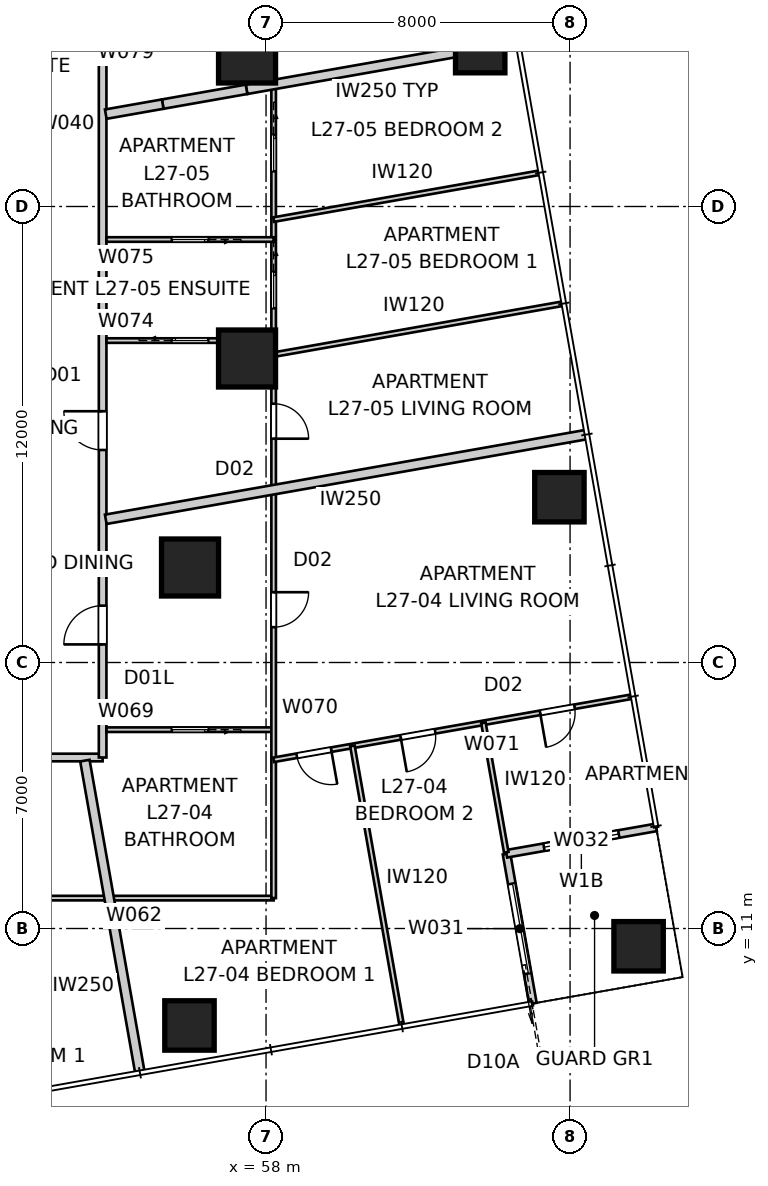
"""IFC4 building model, lengths in metres.
Left out: names, types, materials, properties, quantities, classifications, styles, units other than length and angle.
Written with IfcOpenShell. Run it as: python <this file> out.ifc"""

import sys

from ifc_helpers import new_model, si_unit, direction, frame, frame_2d, origin, origin_2d, place, context, subcontext, project, spatial, rectangle, extrude, element, fill, save


model = new_model("IFC4")
c1 = context("Model", 3, precision=1e-05, world=origin(), true_north=direction((0.0, 1.0)))
c2 = subcontext(c1, "Body", "Model", "MODEL_VIEW")
j1 = project(units=[si_unit("LENGTHUNIT", "METRE"), si_unit("PLANEANGLEUNIT", "RADIAN")], contexts=[c1])
p1 = place(None, origin())
s1 = spatial("IfcSite", under=j1, at=p1, CompositionType="ELEMENT")
p2 = place(p1, origin())
s2 = spatial("IfcBuilding", under=s1, at=p2, CompositionType="ELEMENT")
p3 = place(p2, frame((0.0, 0.0, 99.8)))
s3 = spatial("IfcBuildingStorey", under=s2, at=p3, CompositionType="ELEMENT", Elevation=99.8)
for number, where, z_axis, x_axis in (
    (1, (55.985, 8.448, 0.0), (0.0, 0.0, 1.0), (1.0, 0.0, 0.0)),
    (2, (67.803, 10.532, 0.0), (0.0, 0.0, 1.0), (1.0, 0.0, 0.0)),
    (3, (65.719, 22.35, 0.0), (0.0, 0.0, 1.0), (1.0, 0.0, 0.0)),
    (4, (63.635, 34.167, 0.0), (0.0, 0.0, 1.0), (1.0, 0.0, 0.0)),
):
    element("IfcColumn", number, at=place(p3, frame(where, z_axis=z_axis, x_axis=x_axis)), inside=s3, PredefinedType="COLUMN", context=c2, shape_type="SweptSolid", body=[
        extrude(rectangle(XDim=1.3, YDim=1.3, at=origin_2d()), origin(), (0.0, 0.0, 1.0), 3.4),
    ])
for number, where, z_axis, x_axis in (
    (5, (57.5, 26.0, 0.0), (0.0, 0.0, 1.0), (1.0, 0.0, 0.0)),
    (6, (57.5, 34.0, 0.0), (0.0, 0.0, 1.0), (1.0, 0.0, 0.0)),
    (7, (56.0, 20.5, 0.0), (0.0, 0.0, 1.0), (1.0, 0.0, 0.0)),
):
    element("IfcColumn", number, at=place(p3, frame(where, z_axis=z_axis, x_axis=x_axis)), inside=s3, PredefinedType="COLUMN", context=c2, shape_type="SweptSolid", body=[
        extrude(rectangle(XDim=1.5, YDim=1.5, at=origin_2d()), origin(), (0.0, 0.0, 1.0), 3.4),
    ])
p4 = place(p3, frame((65.022, 9.026, 0.0), z_axis=(0.0, 0.0, 1.0), x_axis=(-0.173646056486, 0.984808127031, 0.0)))
e8 = element("IfcWall", 8, at=p4, inside=s3, PredefinedType="SOLIDWALL", context=c2, shape_type="SweptSolid", body=[
    extrude(rectangle(XDim=4.0, YDim=0.2, at=frame_2d((2.0, 0.0))), origin(), (0.0, 0.0, 1.0), 3.25),
])
p5 = place(p4, frame((0.8, 0.0, 0.0)))
e9 = element("IfcOpeningElement", 9, at=p5, cuts=e8, PredefinedType="OPENING", context=c2, shape_type="SweptSolid", body=[
    extrude(rectangle(XDim=2.4, YDim=2.1, at=frame_2d((1.2, 1.05))), frame((0.0, 0.11, 0.0), z_axis=(0.0, -1.0, 0.0), x_axis=(1.0, 0.0, 0.0)), (0.0, 0.0, 1.0), 0.22),
])
p6 = place(p3, frame((64.328, 12.966, 0.0), z_axis=(0.0, 0.0, 1.0), x_axis=(0.984808127031, 0.173646056486, 0.0)))
e10 = element("IfcWall", 10, at=p6, inside=s3, PredefinedType="SOLIDWALL", context=c2, shape_type="SweptSolid", body=[
    extrude(rectangle(XDim=4.0, YDim=0.2, at=frame_2d((2.0, 0.0))), origin(), (0.0, 0.0, 1.0), 3.25),
])
p7 = place(p6, frame((1.0, 0.0, 0.45)))
e11 = element("IfcOpeningElement", 11, at=p7, cuts=e10, PredefinedType="OPENING", context=c2, shape_type="SweptSolid", body=[
    extrude(rectangle(XDim=2.0, YDim=1.8, at=frame_2d((1.0, 0.9))), frame((0.0, 0.11, 0.0), z_axis=(0.0, -1.0, 0.0), x_axis=(1.0, 0.0, 0.0)), (0.0, 0.0, 1.0), 0.22),
])
p8 = place(p3, frame((26.3, 15.5, 0.0), z_axis=(0.0, 0.0, 1.0), x_axis=(1.0, 0.0, 0.0)))
e12 = element("IfcWall", 12, at=p8, inside=s3, PredefinedType="PARTITIONING", context=c2, shape_type="SweptSolid", body=[
    extrude(rectangle(XDim=27.4, YDim=0.2, at=frame_2d((13.7, 0.0))), origin(), (0.0, 0.0, 1.0), 3.25),
])
p9 = place(p8, frame((24.005, 0.0, 0.0)))
e13 = element("IfcOpeningElement", 13, at=p9, cuts=e12, PredefinedType="OPENING", context=c2, shape_type="SweptSolid", body=[
    extrude(rectangle(XDim=1.02, YDim=2.1, at=frame_2d((0.51, 1.05))), frame((0.0, 0.11, 0.0), z_axis=(0.0, -1.0, 0.0), x_axis=(1.0, 0.0, 0.0)), (0.0, 0.0, 1.0), 0.22),
])
p10 = place(p8, frame((1.765, 0.0, 0.0)))
e14 = element("IfcOpeningElement", 14, at=p10, cuts=e12, PredefinedType="OPENING", context=c2, shape_type="SweptSolid", body=[
    extrude(rectangle(XDim=1.02, YDim=2.1, at=frame_2d((0.51, 1.05))), frame((0.0, 0.11, 0.0), z_axis=(0.0, -1.0, 0.0), x_axis=(1.0, 0.0, 0.0)), (0.0, 0.0, 1.0), 0.22),
])
p11 = place(p3, frame((53.7, 15.5, 0.0), z_axis=(0.0, 0.0, 1.0), x_axis=(0.0, 1.0, 0.0)))
e15 = element("IfcWall", 15, at=p11, inside=s3, PredefinedType="PARTITIONING", context=c2, shape_type="SweptSolid", body=[
    extrude(rectangle(XDim=29.0, YDim=0.2, at=frame_2d((14.5, 0.0))), origin(), (0.0, 0.0, 1.0), 3.25),
])
p12 = place(p11, frame((24.248, 0.0, 0.0)))
e16 = element("IfcOpeningElement", 16, at=p12, cuts=e15, PredefinedType="OPENING", context=c2, shape_type="SweptSolid", body=[
    extrude(rectangle(XDim=1.02, YDim=2.34, at=frame_2d((0.51, 1.17))), frame((0.0, 0.11, 0.0), z_axis=(0.0, -1.0, 0.0), x_axis=(1.0, 0.0, 0.0)), (0.0, 0.0, 1.0), 0.22),
])
p13 = place(p11, frame((2.976, 0.0, 0.0)))
e17 = element("IfcOpeningElement", 17, at=p13, cuts=e15, PredefinedType="OPENING", context=c2, shape_type="SweptSolid", body=[
    extrude(rectangle(XDim=1.02, YDim=2.1, at=frame_2d((0.51, 1.05))), frame((0.0, 0.11, 0.0), z_axis=(0.0, -1.0, 0.0), x_axis=(1.0, 0.0, 0.0)), (0.0, 0.0, 1.0), 0.22),
])
p14 = place(p11, frame((8.092, 0.0, 0.0)))
e18 = element("IfcOpeningElement", 18, at=p14, cuts=e15, PredefinedType="OPENING", context=c2, shape_type="SweptSolid", body=[
    extrude(rectangle(XDim=1.02, YDim=2.34, at=frame_2d((0.51, 1.17))), frame((0.0, 0.11, 0.0), z_axis=(0.0, -1.0, 0.0), x_axis=(1.0, 0.0, 0.0)), (0.0, 0.0, 1.0), 0.22),
])
p15 = place(p3, frame((54.682, 7.203, 0.0), z_axis=(0.0, 0.0, 1.0), x_axis=(-0.173651756605, 0.984807121942, 0.0)))
e19 = element("IfcWall", 19, at=p15, inside=s3, PredefinedType="PARTITIONING", context=c2, shape_type="SweptSolid", body=[
    extrude(rectangle(XDim=8.341, YDim=0.25, at=frame_2d((4.171, 0.0))), origin(), (0.0, 0.0, 1.0), 3.25),
])
p16 = place(p3, frame((66.444, 24.001, 0.0), z_axis=(0.0, 0.0, 1.0), x_axis=(-0.984809355703, -0.173639088111, 0.0)))
e20 = element("IfcWall", 20, at=p16, inside=s3, PredefinedType="PARTITIONING", context=c2, shape_type="SweptSolid", body=[
    extrude(rectangle(XDim=12.857, YDim=0.25, at=frame_2d((6.428, 0.0))), origin(), (0.0, 0.0, 1.0), 3.25),
])
p17 = place(p3, frame((64.62, 34.341, 0.0), z_axis=(0.0, 0.0, 1.0), x_axis=(-0.984802553948, -0.173677660443, 0.0)))
e21 = element("IfcWall", 21, at=p17, inside=s3, PredefinedType="PARTITIONING", context=c2, shape_type="SweptSolid", body=[
    extrude(rectangle(XDim=7.244, YDim=0.25, at=frame_2d((3.622, 0.0))), origin(), (0.0, 0.0, 1.0), 3.25),
])
p18 = place(p3, frame((57.487, 33.083, 0.0), z_axis=(0.0, 0.0, 1.0), x_axis=(-0.984809882944, -0.17363609779, 0.0)))
e22 = element("IfcWall", 22, at=p18, inside=s3, PredefinedType="PARTITIONING", context=c2, shape_type="SweptSolid", body=[
    extrude(rectangle(XDim=2.24, YDim=0.25, at=frame_2d((1.12, 0.0))), origin(), (0.0, 0.0, 1.0), 2.795),
])
p19 = place(p3, frame((55.281, 32.694, 0.0), z_axis=(0.0, 0.0, 1.0), x_axis=(-0.984815846312, -0.173602272028, 0.0)))
e23 = element("IfcWall", 23, at=p19, inside=s3, PredefinedType="PARTITIONING", context=c2, shape_type="SweptSolid", body=[
    extrude(rectangle(XDim=1.522, YDim=0.25, at=frame_2d((0.761, 0.0))), origin(), (0.0, 0.0, 1.0), 3.25),
])
p20 = place(p3, frame((58.2, 11.8, 0.0), z_axis=(0.0, 0.0, 1.0), x_axis=(-1.0, 0.0, 0.0)))
e24 = element("IfcWall", 24, at=p20, inside=s3, PredefinedType="PARTITIONING", context=c2, shape_type="SweptSolid", body=[
    extrude(rectangle(XDim=25.653, YDim=0.12, at=frame_2d((12.826, 0.0))), origin(), (0.0, 0.0, 1.0), 3.25),
])
p21 = place(p20, frame((7.342, 0.0, 0.0)))
e25 = element("IfcOpeningElement", 25, at=p21, cuts=e24, PredefinedType="OPENING", context=c2, shape_type="SweptSolid", body=[
    extrude(rectangle(XDim=0.92, YDim=2.34, at=frame_2d((0.46, 1.17))), frame((0.0, 0.07, 0.0), z_axis=(0.0, -1.0, 0.0), x_axis=(1.0, 0.0, 0.0)), (0.0, 0.0, 1.0), 0.14),
])
p22 = place(p20, frame((12.394, 0.0, 0.0)))
e26 = element("IfcOpeningElement", 26, at=p22, cuts=e24, PredefinedType="OPENING", context=c2, shape_type="SweptSolid", body=[
    extrude(rectangle(XDim=0.96, YDim=2.1, at=frame_2d((0.48, 1.05))), frame((0.0, 0.07, 0.0), z_axis=(0.0, -1.0, 0.0), x_axis=(1.0, 0.0, 0.0)), (0.0, 0.0, 1.0), 0.14),
])
p23 = place(p20, frame((16.288, 0.0, 0.0)))
e27 = element("IfcOpeningElement", 27, at=p23, cuts=e24, PredefinedType="OPENING", context=c2, shape_type="SweptSolid", body=[
    extrude(rectangle(XDim=0.96, YDim=2.1, at=frame_2d((0.48, 1.05))), frame((0.0, 0.07, 0.0), z_axis=(0.0, -1.0, 0.0), x_axis=(1.0, 0.0, 0.0)), (0.0, 0.0, 1.0), 0.14),
])
p24 = place(p20, frame((20.134, 0.0, 0.0)))
e28 = element("IfcOpeningElement", 28, at=p24, cuts=e24, PredefinedType="OPENING", context=c2, shape_type="SweptSolid", body=[
    extrude(rectangle(XDim=0.92, YDim=2.34, at=frame_2d((0.46, 1.17))), frame((0.0, 0.07, 0.0), z_axis=(0.0, -1.0, 0.0), x_axis=(1.0, 0.0, 0.0)), (0.0, 0.0, 1.0), 0.14),
])
p25 = place(p3, frame((58.2, 16.232, 0.0), z_axis=(0.0, 0.0, 1.0), x_axis=(-1.0, 0.0, 0.0)))
e29 = element("IfcWall", 29, at=p25, inside=s3, PredefinedType="PARTITIONING", context=c2, shape_type="SweptSolid", body=[
    extrude(rectangle(XDim=4.4, YDim=0.12, at=frame_2d((2.2, 0.0))), origin(), (0.0, 0.0, 1.0), 3.25),
])
p26 = place(p25, frame((1.72, 0.0, 0.0)))
e30 = element("IfcOpeningElement", 30, at=p26, cuts=e29, PredefinedType="OPENING", context=c2, shape_type="SweptSolid", body=[
    extrude(rectangle(XDim=0.96, YDim=2.1, at=frame_2d((0.48, 1.05))), frame((0.0, 0.07, 0.0), z_axis=(0.0, -1.0, 0.0), x_axis=(1.0, 0.0, 0.0)), (0.0, 0.0, 1.0), 0.14),
])
p27 = place(p3, frame((58.2, 48.2, 0.0), z_axis=(0.0, 0.0, 1.0), x_axis=(0.0, -1.0, 0.0)))
e31 = element("IfcWall", 31, at=p27, inside=s3, PredefinedType="PARTITIONING", context=c2, shape_type="SweptSolid", body=[
    extrude(rectangle(XDim=36.4, YDim=0.12, at=frame_2d((18.2, 0.0))), origin(), (0.0, 0.0, 1.0), 3.25),
])
p28 = place(p27, frame((5.671, 0.0, 0.0)))
e32 = element("IfcOpeningElement", 32, at=p28, cuts=e31, PredefinedType="OPENING", context=c2, shape_type="SweptSolid", body=[
    extrude(rectangle(XDim=0.92, YDim=2.34, at=frame_2d((0.46, 1.17))), frame((0.0, 0.07, 0.0), z_axis=(0.0, -1.0, 0.0), x_axis=(1.0, 0.0, 0.0)), (0.0, 0.0, 1.0), 0.14),
])
p29 = place(p27, frame((8.83, 0.0, 0.0)))
e33 = element("IfcOpeningElement", 33, at=p29, cuts=e31, PredefinedType="OPENING", context=c2, shape_type="SweptSolid", body=[
    extrude(rectangle(XDim=0.92, YDim=2.34, at=frame_2d((0.46, 1.17))), frame((0.0, 0.07, 0.0), z_axis=(0.0, -1.0, 0.0), x_axis=(1.0, 0.0, 0.0)), (0.0, 0.0, 1.0), 0.14),
])
p30 = place(p27, frame((28.35, 0.0, 0.0)))
e34 = element("IfcOpeningElement", 34, at=p30, cuts=e31, PredefinedType="OPENING", context=c2, shape_type="SweptSolid", body=[
    extrude(rectangle(XDim=0.92, YDim=2.34, at=frame_2d((0.46, 1.17))), frame((0.0, 0.07, 0.0), z_axis=(0.0, -1.0, 0.0), x_axis=(1.0, 0.0, 0.0)), (0.0, 0.0, 1.0), 0.14),
])
p31 = place(p27, frame((23.39, 0.0, 0.0)))
e35 = element("IfcOpeningElement", 35, at=p31, cuts=e31, PredefinedType="OPENING", context=c2, shape_type="SweptSolid", body=[
    extrude(rectangle(XDim=0.92, YDim=2.34, at=frame_2d((0.46, 1.17))), frame((0.0, 0.07, 0.0), z_axis=(0.0, -1.0, 0.0), x_axis=(1.0, 0.0, 0.0)), (0.0, 0.0, 1.0), 0.14),
])
p32 = place(p27, frame((19.918, 0.0, 0.0)))
e36 = element("IfcOpeningElement", 36, at=p32, cuts=e31, PredefinedType="OPENING", context=c2, shape_type="SweptSolid", body=[
    extrude(rectangle(XDim=0.96, YDim=2.1, at=frame_2d((0.48, 1.05))), frame((0.0, 0.07, 0.0), z_axis=(0.0, -1.0, 0.0), x_axis=(1.0, 0.0, 0.0)), (0.0, 0.0, 1.0), 0.14),
])
p33 = place(p27, frame((16.313, 0.0, 0.0)))
e37 = element("IfcOpeningElement", 37, at=p33, cuts=e31, PredefinedType="OPENING", context=c2, shape_type="SweptSolid", body=[
    extrude(rectangle(XDim=0.96, YDim=2.1, at=frame_2d((0.48, 1.05))), frame((0.0, 0.07, 0.0), z_axis=(0.0, -1.0, 0.0), x_axis=(1.0, 0.0, 0.0)), (0.0, 0.0, 1.0), 0.14),
])
p34 = place(p3, frame((67.62, 17.1, 0.0), z_axis=(0.0, 0.0, 1.0), x_axis=(-0.984808730291, -0.173642635155, 0.0)))
e38 = element("IfcWall", 38, at=p34, inside=s3, PredefinedType="PARTITIONING", context=c2, shape_type="SweptSolid", body=[
    extrude(rectangle(XDim=9.565, YDim=0.12, at=frame_2d((4.782, 0.0))), origin(), (0.0, 0.0, 1.0), 3.25),
])
p35 = place(p34, frame((1.525, 0.0, 0.0)))
e39 = element("IfcOpeningElement", 39, at=p35, cuts=e38, PredefinedType="OPENING", context=c2, shape_type="SweptSolid", body=[
    extrude(rectangle(XDim=0.92, YDim=2.34, at=frame_2d((0.46, 1.17))), frame((0.0, 0.07, 0.0), z_axis=(0.0, -1.0, 0.0), x_axis=(1.0, 0.0, 0.0)), (0.0, 0.0, 1.0), 0.14),
])
p36 = place(p34, frame((5.25, 0.0, 0.0)))
e40 = element("IfcOpeningElement", 40, at=p36, cuts=e38, PredefinedType="OPENING", context=c2, shape_type="SweptSolid", body=[
    extrude(rectangle(XDim=0.92, YDim=2.34, at=frame_2d((0.46, 1.17))), frame((0.0, 0.07, 0.0), z_axis=(0.0, -1.0, 0.0), x_axis=(1.0, 0.0, 0.0)), (0.0, 0.0, 1.0), 0.14),
])
p37 = place(p34, frame((8.028, 0.0, 0.0)))
e41 = element("IfcOpeningElement", 41, at=p37, cuts=e38, PredefinedType="OPENING", context=c2, shape_type="SweptSolid", body=[
    extrude(rectangle(XDim=0.92, YDim=2.34, at=frame_2d((0.46, 1.17))), frame((0.0, 0.07, 0.0), z_axis=(0.0, -1.0, 0.0), x_axis=(1.0, 0.0, 0.0)), (0.0, 0.0, 1.0), 0.14),
])
p38 = place(p3, frame((60.273, 15.805, 0.0), z_axis=(0.0, 0.0, 1.0), x_axis=(0.173647177755, -0.984807929323, 0.0)))
e42 = element("IfcWall", 42, at=p38, inside=s3, PredefinedType="PARTITIONING", context=c2, shape_type="SweptSolid", body=[
    extrude(rectangle(XDim=7.46, YDim=0.12, at=frame_2d((3.73, 0.0))), origin(), (0.0, 0.0, 1.0), 3.25),
])
p39 = place(p3, frame((63.72, 16.412, 0.0), z_axis=(0.0, 0.0, 1.0), x_axis=(0.173660541335, -0.984805572884, 0.0)))
e43 = element("IfcWall", 43, at=p39, inside=s3, PredefinedType="PARTITIONING", context=c2, shape_type="SweptSolid", body=[
    extrude(rectangle(XDim=3.46, YDim=0.12, at=frame_2d((1.73, 0.0))), origin(), (0.0, 0.0, 1.0), 3.25),
])
p40 = place(p3, frame((53.8, 26.472, 0.0), z_axis=(0.0, 0.0, 1.0), x_axis=(1.0, 0.0, 0.0)))
e44 = element("IfcWall", 44, at=p40, inside=s3, PredefinedType="PARTITIONING", context=c2, shape_type="SweptSolid", body=[
    extrude(rectangle(XDim=4.4, YDim=0.12, at=frame_2d((2.2, 0.0))), origin(), (0.0, 0.0, 1.0), 3.25),
])
p41 = place(p40, frame((1.72, 0.0, 0.0)))
e45 = element("IfcOpeningElement", 45, at=p41, cuts=e44, PredefinedType="OPENING", context=c2, shape_type="SweptSolid", body=[
    extrude(rectangle(XDim=0.96, YDim=2.1, at=frame_2d((0.48, 1.05))), frame((0.0, 0.07, 0.0), z_axis=(0.0, -1.0, 0.0), x_axis=(1.0, 0.0, 0.0)), (0.0, 0.0, 1.0), 0.14),
])
p42 = place(p3, frame((58.2, 29.131, 0.0), z_axis=(0.0, 0.0, 1.0), x_axis=(-1.0, 0.0, 0.0)))
e46 = element("IfcWall", 46, at=p42, inside=s3, PredefinedType="PARTITIONING", context=c2, shape_type="SweptSolid", body=[
    extrude(rectangle(XDim=4.4, YDim=0.12, at=frame_2d((2.2, 0.0))), origin(), (0.0, 0.0, 1.0), 3.25),
])
p43 = place(p42, frame((1.72, 0.0, 0.0)))
e47 = element("IfcOpeningElement", 47, at=p43, cuts=e46, PredefinedType="OPENING", context=c2, shape_type="SweptSolid", body=[
    extrude(rectangle(XDim=0.96, YDim=2.1, at=frame_2d((0.48, 1.05))), frame((0.0, 0.07, 0.0), z_axis=(0.0, -1.0, 0.0), x_axis=(1.0, 0.0, 0.0)), (0.0, 0.0, 1.0), 0.14),
])
p44 = place(p3, frame((58.2, 26.101, 0.0), z_axis=(0.0, 0.0, 1.0), x_axis=(0.984804581119, 0.173666165406, 0.0)))
e48 = element("IfcWall", 48, at=p44, inside=s3, PredefinedType="PARTITIONING", context=c2, shape_type="SweptSolid", body=[
    extrude(rectangle(XDim=7.714, YDim=0.12, at=frame_2d((3.857, 0.0))), origin(), (0.0, 0.0, 1.0), 3.25),
])
p45 = place(p3, frame((58.2, 29.655, 0.0), z_axis=(0.0, 0.0, 1.0), x_axis=(0.984809869921, 0.17363617165, 0.0)))
e49 = element("IfcWall", 49, at=p45, inside=s3, PredefinedType="PARTITIONING", context=c2, shape_type="SweptSolid", body=[
    extrude(rectangle(XDim=7.096, YDim=0.12, at=frame_2d((3.548, 0.0))), origin(), (0.0, 0.0, 1.0), 3.25),
])
p46 = place(p5, origin())
e50 = element("IfcDoor", 50, at=p46, inside=s3, OperationType="SLIDING_TO_LEFT", PredefinedType="DOOR", context=c2, shape_type="SweptSolid", body=[
    extrude(rectangle(XDim=2.4, YDim=2.1, at=frame_2d((1.2, 1.05))), frame((0.0, 0.025, 0.0), z_axis=(0.0, -1.0, 0.0), x_axis=(1.0, 0.0, 0.0)), (0.0, 0.0, 1.0), 0.05),
])
fill(e9, e50)
p47 = place(p7, origin())
e51 = element("IfcWindow", 51, at=p47, inside=s3, PartitioningType="SINGLE_PANEL", PredefinedType="WINDOW", context=c2, shape_type="SweptSolid", body=[
    extrude(rectangle(XDim=2.0, YDim=1.8, at=frame_2d((1.0, 0.9))), frame((0.0, 0.03, 0.0), z_axis=(0.0, -1.0, 0.0), x_axis=(1.0, 0.0, 0.0)), (0.0, 0.0, 1.0), 0.06),
])
fill(e11, e51)
p48 = place(p13, origin())
e52 = element("IfcDoor", 52, at=p48, inside=s3, OperationType="SINGLE_SWING_LEFT", PredefinedType="DOOR", context=c2, shape_type="SweptSolid", body=[
    extrude(rectangle(XDim=1.02, YDim=2.1, at=frame_2d((0.51, 1.05))), frame((0.0, 0.025, 0.0), z_axis=(0.0, -1.0, 0.0), x_axis=(1.0, 0.0, 0.0)), (0.0, 0.0, 1.0), 0.05),
])
fill(e17, e52)
p49 = place(p14, origin())
e53 = element("IfcDoor", 53, at=p49, inside=s3, OperationType="SINGLE_SWING_RIGHT", PredefinedType="DOOR", context=c2, shape_type="SweptSolid", body=[
    extrude(rectangle(XDim=1.02, YDim=2.34, at=frame_2d((0.51, 1.17))), frame((0.0, 0.025, 0.0), z_axis=(0.0, -1.0, 0.0), x_axis=(1.0, 0.0, 0.0)), (0.0, 0.0, 1.0), 0.05),
])
fill(e18, e53)
p50 = place(p30, origin())
e54 = element("IfcDoor", 54, at=p50, inside=s3, OperationType="SINGLE_SWING_LEFT", PredefinedType="DOOR", context=c2, shape_type="SweptSolid", body=[
    extrude(rectangle(XDim=0.92, YDim=2.34, at=frame_2d((0.46, 1.17))), frame((0.0, 0.025, 0.0), z_axis=(0.0, -1.0, 0.0), x_axis=(1.0, 0.0, 0.0)), (0.0, 0.0, 1.0), 0.05),
])
fill(e34, e54)
p51 = place(p26, origin())
e55 = element("IfcDoor", 55, at=p51, inside=s3, OperationType="SLIDING_TO_LEFT", PredefinedType="DOOR", context=c2, shape_type="SweptSolid", body=[
    extrude(rectangle(XDim=0.96, YDim=2.1, at=frame_2d((0.48, 1.05))), frame((0.0, 0.025, 0.0), z_axis=(0.0, -1.0, 0.0), x_axis=(1.0, 0.0, 0.0)), (0.0, 0.0, 1.0), 0.05),
])
fill(e30, e55)
p52 = place(p41, origin())
e56 = element("IfcDoor", 56, at=p52, inside=s3, OperationType="SLIDING_TO_LEFT", PredefinedType="DOOR", context=c2, shape_type="SweptSolid", body=[
    extrude(rectangle(XDim=0.96, YDim=2.1, at=frame_2d((0.48, 1.05))), frame((0.0, 0.025, 0.0), z_axis=(0.0, -1.0, 0.0), x_axis=(1.0, 0.0, 0.0)), (0.0, 0.0, 1.0), 0.05),
])
fill(e45, e56)
p53 = place(p31, origin())
e57 = element("IfcDoor", 57, at=p53, inside=s3, OperationType="SINGLE_SWING_RIGHT", PredefinedType="DOOR", context=c2, shape_type="SweptSolid", body=[
    extrude(rectangle(XDim=0.92, YDim=2.34, at=frame_2d((0.46, 1.17))), frame((0.0, 0.025, 0.0), z_axis=(0.0, -1.0, 0.0), x_axis=(1.0, 0.0, 0.0)), (0.0, 0.0, 1.0), 0.05),
])
fill(e35, e57)
p54 = place(p35, origin())
e58 = element("IfcDoor", 58, at=p54, inside=s3, OperationType="SINGLE_SWING_RIGHT", PredefinedType="DOOR", context=c2, shape_type="SweptSolid", body=[
    extrude(rectangle(XDim=0.92, YDim=2.34, at=frame_2d((0.46, 1.17))), frame((0.0, 0.025, 0.0), z_axis=(0.0, -1.0, 0.0), x_axis=(1.0, 0.0, 0.0)), (0.0, 0.0, 1.0), 0.05),
])
fill(e39, e58)
p55 = place(p36, origin())
e59 = element("IfcDoor", 59, at=p55, inside=s3, OperationType="SINGLE_SWING_RIGHT", PredefinedType="DOOR", context=c2, shape_type="SweptSolid", body=[
    extrude(rectangle(XDim=0.92, YDim=2.34, at=frame_2d((0.46, 1.17))), frame((0.0, 0.025, 0.0), z_axis=(0.0, -1.0, 0.0), x_axis=(1.0, 0.0, 0.0)), (0.0, 0.0, 1.0), 0.05),
])
fill(e40, e59)
p56 = place(p37, origin())
e60 = element("IfcDoor", 60, at=p56, inside=s3, OperationType="SINGLE_SWING_LEFT", PredefinedType="DOOR", context=c2, shape_type="SweptSolid", body=[
    extrude(rectangle(XDim=0.92, YDim=2.34, at=frame_2d((0.46, 1.17))), frame((0.0, 0.025, 0.0), z_axis=(0.0, -1.0, 0.0), x_axis=(1.0, 0.0, 0.0)), (0.0, 0.0, 1.0), 0.05),
])
fill(e41, e60)
p57 = place(p43, origin())
e61 = element("IfcDoor", 61, at=p57, inside=s3, OperationType="SLIDING_TO_LEFT", PredefinedType="DOOR", context=c2, shape_type="SweptSolid", body=[
    extrude(rectangle(XDim=0.96, YDim=2.1, at=frame_2d((0.48, 1.05))), frame((0.0, 0.025, 0.0), z_axis=(0.0, -1.0, 0.0), x_axis=(1.0, 0.0, 0.0)), (0.0, 0.0, 1.0), 0.05),
])
fill(e47, e61)
p58 = place(p32, origin())
e62 = element("IfcDoor", 62, at=p58, inside=s3, OperationType="SLIDING_TO_LEFT", PredefinedType="DOOR", context=c2, shape_type="SweptSolid", body=[
    extrude(rectangle(XDim=0.96, YDim=2.1, at=frame_2d((0.48, 1.05))), frame((0.0, 0.025, 0.0), z_axis=(0.0, -1.0, 0.0), x_axis=(1.0, 0.0, 0.0)), (0.0, 0.0, 1.0), 0.05),
])
fill(e36, e62)
p59 = place(p33, origin())
e63 = element("IfcDoor", 63, at=p59, inside=s3, OperationType="SLIDING_TO_LEFT", PredefinedType="DOOR", context=c2, shape_type="SweptSolid", body=[
    extrude(rectangle(XDim=0.96, YDim=2.1, at=frame_2d((0.48, 1.05))), frame((0.0, 0.025, 0.0), z_axis=(0.0, -1.0, 0.0), x_axis=(1.0, 0.0, 0.0)), (0.0, 0.0, 1.0), 0.05),
])
fill(e37, e63)
save(model, sys.argv[1])
